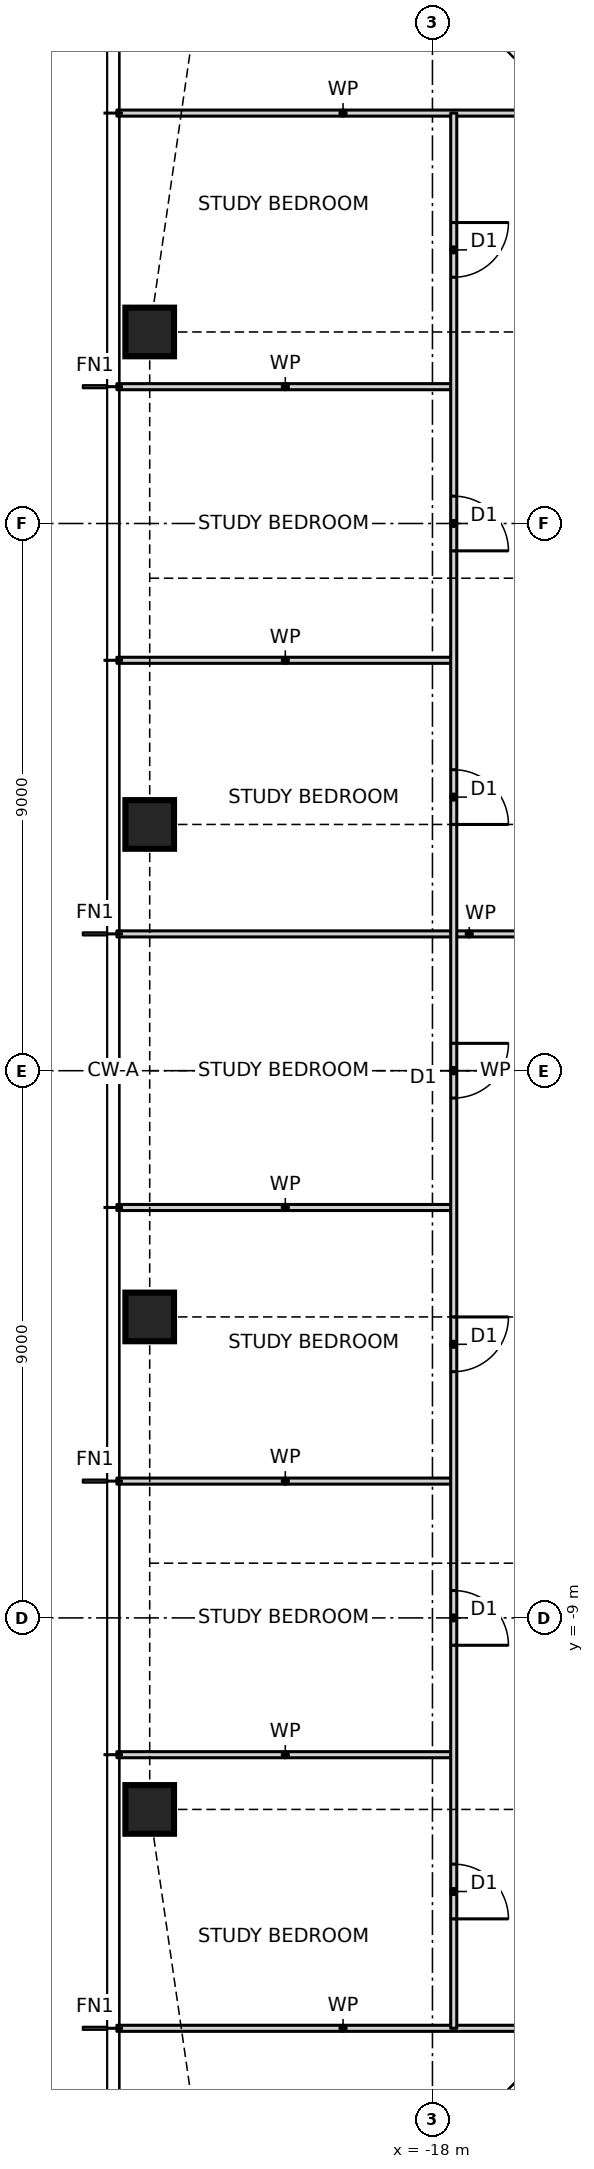
"""IFC4 building model, lengths in metres.
Left out: names, types, materials, properties, quantities, classifications, styles, units other than length and angle.
Written with IfcOpenShell. Run it as: python <this file> out.ifc"""

import sys

from ifc_helpers import new_model, si_unit, direction, frame, frame_2d, origin, origin_2d, place, context, subcontext, project, spatial, rectangle, hollow_rectangle, extrude, element, fill, save


model = new_model("IFC4")
c1 = context("Model", 3, precision=1e-05, world=origin(), true_north=direction((0.0, 1.0)))
c2 = subcontext(c1, "Body", "Model", "MODEL_VIEW")
j1 = project(units=[si_unit("LENGTHUNIT", "METRE"), si_unit("PLANEANGLEUNIT", "RADIAN")], contexts=[c1])
p1 = place(None, origin())
s1 = spatial("IfcSite", under=j1, at=p1, CompositionType="ELEMENT")
p2 = place(p1, origin())
s2 = spatial("IfcBuilding", under=s1, at=p2, CompositionType="ELEMENT")
p3 = place(p2, frame((0.0, 0.0, 57.0)))
s3 = spatial("IfcBuildingStorey", under=s2, at=p3, CompositionType="ELEMENT", Elevation=57.0)
for number, where, z_axis, x_axis in (
    (1, (-22.65, 12.15, 0.0), (0.0, 0.0, 1.0), (1.0, 0.0, 0.0)),
    (2, (-22.65, 4.05, 0.0), (0.0, 0.0, 1.0), (1.0, 0.0, 0.0)),
    (3, (-22.65, -4.05, 0.0), (0.0, 0.0, 1.0), (1.0, 0.0, 0.0)),
    (4, (-22.65, -12.15, 0.0), (0.0, 0.0, 1.0), (1.0, 0.0, 0.0)),
):
    element("IfcColumn", number, at=place(p3, frame(where, z_axis=z_axis, x_axis=x_axis)), inside=s3, PredefinedType="COLUMN", context=c2, shape_type="SweptSolid", body=[
        extrude(hollow_rectangle(XDim=0.8, YDim=0.8, WallThickness=0.09, at=origin_2d()), origin(), (0.0, 0.0, 1.0), 3.5),
    ])
p4 = place(p3, frame((-23.19, -15.75, 0.0), z_axis=(0.0, 0.0, 1.0), x_axis=(1.0, 0.0, 0.0)))
e5 = element("IfcWall", 5, at=p4, inside=s3, PredefinedType="PARTITIONING", context=c2, shape_type="SweptSolid", body=[
    extrude(rectangle(XDim=7.44, YDim=0.1, at=frame_2d((3.72, 0.0))), origin(), (0.0, 0.0, 1.0), 3.27),
])
for number, where, z_axis, x_axis in (
    (6, (-23.19, -11.25, 0.0), (0.0, 0.0, 1.0), (1.0, 0.0, 0.0)),
    (7, (-23.19, -6.75, 0.0), (0.0, 0.0, 1.0), (1.0, 0.0, 0.0)),
    (8, (-23.19, -2.25, 0.0), (0.0, 0.0, 1.0), (1.0, 0.0, 0.0)),
):
    element("IfcWall", number, at=place(p3, frame(where, z_axis=z_axis, x_axis=x_axis)), inside=s3, PredefinedType="PARTITIONING", context=c2, shape_type="SweptSolid", body=[
        extrude(rectangle(XDim=5.54, YDim=0.1, at=frame_2d((2.77, 0.0))), origin(), (0.0, 0.0, 1.0), 3.27),
    ])
p5 = place(p3, frame((-23.19, 2.25, 0.0), z_axis=(0.0, 0.0, 1.0), x_axis=(1.0, 0.0, 0.0)))
e9 = element("IfcWall", 9, at=p5, inside=s3, PredefinedType="PARTITIONING", context=c2, shape_type="SweptSolid", body=[
    extrude(rectangle(XDim=11.59, YDim=0.1, at=frame_2d((5.795, 0.0))), origin(), (0.0, 0.0, 1.0), 3.27),
])
for number, where, z_axis, x_axis in (
    (10, (-23.19, 6.75, 0.0), (0.0, 0.0, 1.0), (1.0, 0.0, 0.0)),
    (11, (-23.19, 11.25, 0.0), (0.0, 0.0, 1.0), (1.0, 0.0, 0.0)),
):
    element("IfcWall", number, at=place(p3, frame(where, z_axis=z_axis, x_axis=x_axis)), inside=s3, PredefinedType="PARTITIONING", context=c2, shape_type="SweptSolid", body=[
        extrude(rectangle(XDim=5.54, YDim=0.1, at=frame_2d((2.77, 0.0))), origin(), (0.0, 0.0, 1.0), 3.27),
    ])
p6 = place(p3, frame((-23.19, 15.75, 0.0), z_axis=(0.0, 0.0, 1.0), x_axis=(1.0, 0.0, 0.0)))
e12 = element("IfcWall", 12, at=p6, inside=s3, PredefinedType="PARTITIONING", context=c2, shape_type="SweptSolid", body=[
    extrude(rectangle(XDim=7.44, YDim=0.1, at=frame_2d((3.72, 0.0))), origin(), (0.0, 0.0, 1.0), 3.27),
])
p7 = place(p3, frame((-17.65, -15.75, 0.0), z_axis=(0.0, 0.0, 1.0), x_axis=(0.0, 1.0, 0.0)))
e13 = element("IfcWall", 13, at=p7, inside=s3, PredefinedType="PARTITIONING", context=c2, shape_type="SweptSolid", body=[
    extrude(rectangle(XDim=31.5, YDim=0.1, at=frame_2d((15.75, 0.0))), origin(), (0.0, 0.0, 1.0), 3.27),
])
p8 = place(p7, frame((28.8, 0.0, 0.0)))
e14 = element("IfcOpeningElement", 14, at=p8, cuts=e13, PredefinedType="OPENING", context=c2, shape_type="SweptSolid", body=[
    extrude(rectangle(XDim=0.9, YDim=2.1, at=frame_2d((0.45, 1.05))), frame((0.0, 0.06, 0.0), z_axis=(0.0, -1.0, 0.0), x_axis=(1.0, 0.0, 0.0)), (0.0, 0.0, 1.0), 0.12),
])
p9 = place(p7, frame((24.3, 0.0, 0.0)))
e15 = element("IfcOpeningElement", 15, at=p9, cuts=e13, PredefinedType="OPENING", context=c2, shape_type="SweptSolid", body=[
    extrude(rectangle(XDim=0.9, YDim=2.1, at=frame_2d((0.45, 1.05))), frame((0.0, 0.06, 0.0), z_axis=(0.0, -1.0, 0.0), x_axis=(1.0, 0.0, 0.0)), (0.0, 0.0, 1.0), 0.12),
])
p10 = place(p7, frame((19.8, 0.0, 0.0)))
e16 = element("IfcOpeningElement", 16, at=p10, cuts=e13, PredefinedType="OPENING", context=c2, shape_type="SweptSolid", body=[
    extrude(rectangle(XDim=0.9, YDim=2.1, at=frame_2d((0.45, 1.05))), frame((0.0, 0.06, 0.0), z_axis=(0.0, -1.0, 0.0), x_axis=(1.0, 0.0, 0.0)), (0.0, 0.0, 1.0), 0.12),
])
p11 = place(p7, frame((15.3, 0.0, 0.0)))
e17 = element("IfcOpeningElement", 17, at=p11, cuts=e13, PredefinedType="OPENING", context=c2, shape_type="SweptSolid", body=[
    extrude(rectangle(XDim=0.9, YDim=2.1, at=frame_2d((0.45, 1.05))), frame((0.0, 0.06, 0.0), z_axis=(0.0, -1.0, 0.0), x_axis=(1.0, 0.0, 0.0)), (0.0, 0.0, 1.0), 0.12),
])
p12 = place(p7, frame((10.8, 0.0, 0.0)))
e18 = element("IfcOpeningElement", 18, at=p12, cuts=e13, PredefinedType="OPENING", context=c2, shape_type="SweptSolid", body=[
    extrude(rectangle(XDim=0.9, YDim=2.1, at=frame_2d((0.45, 1.05))), frame((0.0, 0.06, 0.0), z_axis=(0.0, -1.0, 0.0), x_axis=(1.0, 0.0, 0.0)), (0.0, 0.0, 1.0), 0.12),
])
p13 = place(p7, frame((6.3, 0.0, 0.0)))
e19 = element("IfcOpeningElement", 19, at=p13, cuts=e13, PredefinedType="OPENING", context=c2, shape_type="SweptSolid", body=[
    extrude(rectangle(XDim=0.9, YDim=2.1, at=frame_2d((0.45, 1.05))), frame((0.0, 0.06, 0.0), z_axis=(0.0, -1.0, 0.0), x_axis=(1.0, 0.0, 0.0)), (0.0, 0.0, 1.0), 0.12),
])
p14 = place(p7, frame((1.8, 0.0, 0.0)))
e20 = element("IfcOpeningElement", 20, at=p14, cuts=e13, PredefinedType="OPENING", context=c2, shape_type="SweptSolid", body=[
    extrude(rectangle(XDim=0.9, YDim=2.1, at=frame_2d((0.45, 1.05))), frame((0.0, 0.06, 0.0), z_axis=(0.0, -1.0, 0.0), x_axis=(1.0, 0.0, 0.0)), (0.0, 0.0, 1.0), 0.12),
])
p15 = place(p8, frame((0.9, 0.0, 0.0), z_axis=(0.0, 0.0, 1.0), x_axis=(-1.0, 0.0, 0.0)))
e21 = element("IfcDoor", 21, at=p15, inside=s3, OperationType="SINGLE_SWING_LEFT", PredefinedType="DOOR", context=c2, shape_type="SweptSolid", body=[
    extrude(rectangle(XDim=0.9, YDim=2.1, at=frame_2d((0.45, 1.05))), frame((0.0, 0.025, 0.0), z_axis=(0.0, -1.0, 0.0), x_axis=(1.0, 0.0, 0.0)), (0.0, 0.0, 1.0), 0.05),
])
fill(e14, e21)
p16 = place(p9, frame((0.9, 0.0, 0.0), z_axis=(0.0, 0.0, 1.0), x_axis=(-1.0, 0.0, 0.0)))
e22 = element("IfcDoor", 22, at=p16, inside=s3, OperationType="SINGLE_SWING_RIGHT", PredefinedType="DOOR", context=c2, shape_type="SweptSolid", body=[
    extrude(rectangle(XDim=0.9, YDim=2.1, at=frame_2d((0.45, 1.05))), frame((0.0, 0.025, 0.0), z_axis=(0.0, -1.0, 0.0), x_axis=(1.0, 0.0, 0.0)), (0.0, 0.0, 1.0), 0.05),
])
fill(e15, e22)
p17 = place(p10, frame((0.9, 0.0, 0.0), z_axis=(0.0, 0.0, 1.0), x_axis=(-1.0, 0.0, 0.0)))
e23 = element("IfcDoor", 23, at=p17, inside=s3, OperationType="SINGLE_SWING_RIGHT", PredefinedType="DOOR", context=c2, shape_type="SweptSolid", body=[
    extrude(rectangle(XDim=0.9, YDim=2.1, at=frame_2d((0.45, 1.05))), frame((0.0, 0.025, 0.0), z_axis=(0.0, -1.0, 0.0), x_axis=(1.0, 0.0, 0.0)), (0.0, 0.0, 1.0), 0.05),
])
fill(e16, e23)
p18 = place(p11, frame((0.9, 0.0, 0.0), z_axis=(0.0, 0.0, 1.0), x_axis=(-1.0, 0.0, 0.0)))
e24 = element("IfcDoor", 24, at=p18, inside=s3, OperationType="SINGLE_SWING_LEFT", PredefinedType="DOOR", context=c2, shape_type="SweptSolid", body=[
    extrude(rectangle(XDim=0.9, YDim=2.1, at=frame_2d((0.45, 1.05))), frame((0.0, 0.025, 0.0), z_axis=(0.0, -1.0, 0.0), x_axis=(1.0, 0.0, 0.0)), (0.0, 0.0, 1.0), 0.05),
])
fill(e17, e24)
p19 = place(p12, frame((0.9, 0.0, 0.0), z_axis=(0.0, 0.0, 1.0), x_axis=(-1.0, 0.0, 0.0)))
e25 = element("IfcDoor", 25, at=p19, inside=s3, OperationType="SINGLE_SWING_LEFT", PredefinedType="DOOR", context=c2, shape_type="SweptSolid", body=[
    extrude(rectangle(XDim=0.9, YDim=2.1, at=frame_2d((0.45, 1.05))), frame((0.0, 0.025, 0.0), z_axis=(0.0, -1.0, 0.0), x_axis=(1.0, 0.0, 0.0)), (0.0, 0.0, 1.0), 0.05),
])
fill(e18, e25)
p20 = place(p13, frame((0.9, 0.0, 0.0), z_axis=(0.0, 0.0, 1.0), x_axis=(-1.0, 0.0, 0.0)))
e26 = element("IfcDoor", 26, at=p20, inside=s3, OperationType="SINGLE_SWING_RIGHT", PredefinedType="DOOR", context=c2, shape_type="SweptSolid", body=[
    extrude(rectangle(XDim=0.9, YDim=2.1, at=frame_2d((0.45, 1.05))), frame((0.0, 0.025, 0.0), z_axis=(0.0, -1.0, 0.0), x_axis=(1.0, 0.0, 0.0)), (0.0, 0.0, 1.0), 0.05),
])
fill(e19, e26)
p21 = place(p14, frame((0.9, 0.0, 0.0), z_axis=(0.0, 0.0, 1.0), x_axis=(-1.0, 0.0, 0.0)))
e27 = element("IfcDoor", 27, at=p21, inside=s3, OperationType="SINGLE_SWING_RIGHT", PredefinedType="DOOR", context=c2, shape_type="SweptSolid", body=[
    extrude(rectangle(XDim=0.9, YDim=2.1, at=frame_2d((0.45, 1.05))), frame((0.0, 0.025, 0.0), z_axis=(0.0, -1.0, 0.0), x_axis=(1.0, 0.0, 0.0)), (0.0, 0.0, 1.0), 0.05),
])
fill(e20, e27)
save(model, sys.argv[1])
